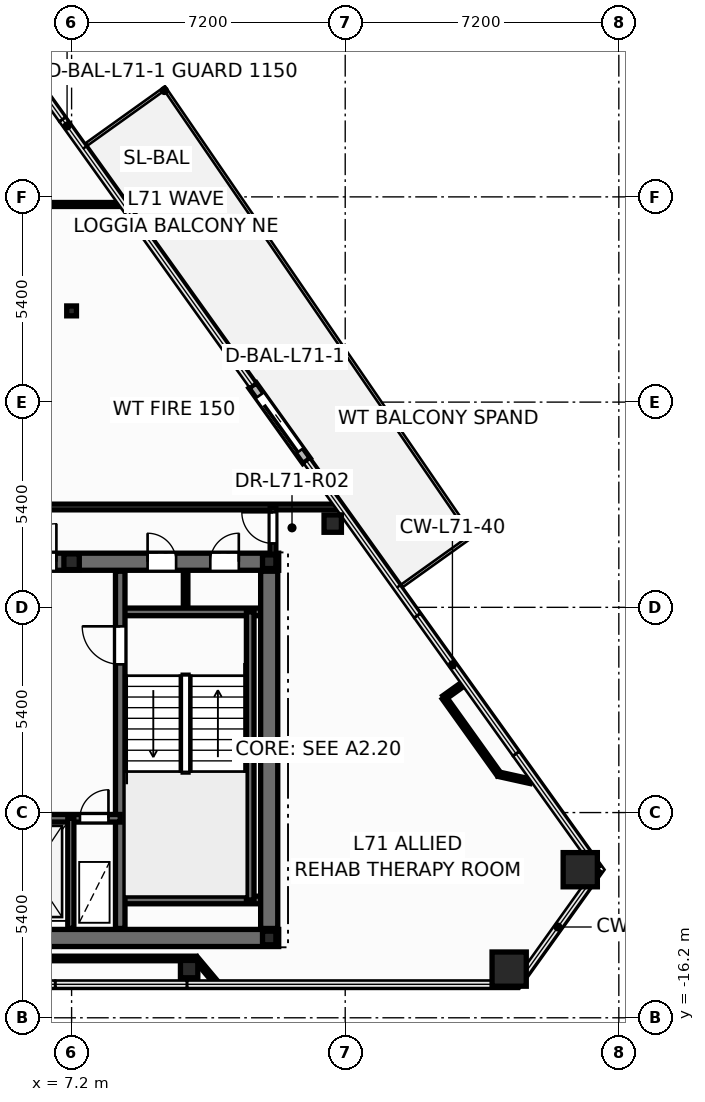
"""IFC4 building model, lengths in metres.
Left out: names, types, materials, properties, quantities, classifications, styles, units other than length and angle.
Written with IfcOpenShell. Run it as: python <this file> out.ifc"""

import sys

from ifc_helpers import new_model, si_unit, direction, frame, frame_2d, origin, origin_2d, place, context, subcontext, project, spatial, rectangle, hollow_rectangle, hollow_circle, i_section, extrude, element, fill, save


model = new_model("IFC4")
c1 = context("Model", 3, precision=1e-05, world=origin(), true_north=direction((0.0, 1.0)))
c2 = subcontext(c1, "Body", "Model", "MODEL_VIEW")
j1 = project(units=[si_unit("LENGTHUNIT", "METRE"), si_unit("PLANEANGLEUNIT", "RADIAN")], contexts=[c1])
p1 = place(None, origin())
s1 = spatial("IfcSite", under=j1, at=p1, CompositionType="ELEMENT")
p2 = place(p1, origin())
s2 = spatial("IfcBuilding", under=s1, at=p2, CompositionType="ELEMENT")
p3 = place(p2, frame((0.0, 0.0, 270.6)))
s3 = spatial("IfcBuildingStorey", under=s2, at=p3, CompositionType="ELEMENT", Elevation=270.6)
for number, where, z_axis, x_axis in (
    (1, (18.714, -14.919, 0.0), (0.0, 0.0, 1.0), (1.0, 0.0, 0.0)),
    (2, (20.585, -12.303, 0.0), (0.0, 0.0, 1.0), (1.0, 0.0, 0.0)),
):
    element("IfcColumn", number, at=place(p3, frame(where, z_axis=z_axis, x_axis=x_axis)), inside=s3, PredefinedType="COLUMN", context=c2, shape_type="SweptSolid", body=[
        extrude(hollow_rectangle(XDim=0.9, YDim=0.9, WallThickness=0.04, at=origin_2d()), origin(), (0.0, 0.0, 1.0), 3.6),
    ])
for number, where, z_axis, x_axis in (
    (3, (10.293, -14.919, 0.0), (0.0, 0.0, 1.0), (1.0, 0.0, 0.0)),
    (4, (14.072, -3.196, 0.0), (0.0, 0.0, 1.0), (1.0, 0.0, 0.0)),
    (5, (8.489, 4.61, 0.0), (0.0, 0.0, 1.0), (1.0, 0.0, 0.0)),
):
    element("IfcColumn", number, at=place(p3, frame(where, z_axis=z_axis, x_axis=x_axis)), inside=s3, PredefinedType="COLUMN", context=c2, shape_type="SweptSolid", body=[
        extrude(hollow_circle(Radius=0.229, WallThickness=0.016, at=origin_2d()), origin(), (0.0, 0.0, 1.0), 3.6),
    ])
for number, where, z_axis, x_axis in (
    (6, (12.4, -14.1, 0.0), (0.0, 0.0, 1.0), (1.0, 0.0, 0.0)),
    (7, (12.4, -4.2, 0.0), (0.0, 0.0, 1.0), (1.0, 0.0, 0.0)),
):
    element("IfcColumn", number, at=place(p3, frame(where, z_axis=z_axis, x_axis=x_axis)), inside=s3, PredefinedType="COLUMN", context=c2, shape_type="SweptSolid", body=[
        extrude(i_section(OverallWidth=0.352, OverallDepth=0.359, WebThickness=0.018, FlangeThickness=0.026, at=origin_2d()), origin(), (0.0, 0.0, 1.0), 3.6),
    ])
p4 = place(p3, frame((7.2, -4.2, 0.0), z_axis=(0.0, 0.0, 1.0), x_axis=(1.0, 0.0, 0.0)))
e8 = element("IfcColumn", 8, at=p4, inside=s3, PredefinedType="PILASTER", context=c2, shape_type="SweptSolid", body=[
    extrude(i_section(OverallWidth=0.405, OverallDepth=0.414, WebThickness=0.022, FlangeThickness=0.032, at=origin_2d()), origin(), (0.0, 0.0, 1.0), 3.6),
])
p5 = place(p3, frame((7.2, 2.4, 0.0), z_axis=(0.0, 0.0, 1.0), x_axis=(1.0, 0.0, 0.0)))
e9 = element("IfcColumn", 9, at=p5, inside=s3, PredefinedType="COLUMN", context=c2, shape_type="SweptSolid", body=[
    extrude(i_section(OverallWidth=0.256, OverallDepth=0.26, WebThickness=0.01, FlangeThickness=0.017, at=origin_2d()), origin(), (0.0, 0.0, 1.0), 3.6),
])
p6 = place(p3, frame((13.383, -1.547, -0.015), z_axis=(0.0, 0.0, 1.0), x_axis=(-0.58167352525, 0.813422344187, 0.0)))
e10 = element("IfcWall", 10, at=p6, inside=s3, PredefinedType="STANDARD", context=c2, shape_type="SweptSolid", body=[
    extrude(rectangle(XDim=2.44, YDim=0.24, at=frame_2d((1.22, 0.0))), origin(), (0.0, 0.0, 1.0), 2.878),
])
p7 = place(p6, frame((0.32, 0.0, 0.015)))
e11 = element("IfcOpeningElement", 11, at=p7, cuts=e10, PredefinedType="OPENING", context=c2, shape_type="SweptSolid", body=[
    extrude(rectangle(XDim=1.806, YDim=2.204, at=frame_2d((0.9, 1.102))), frame((0.0, 0.13, 0.0), z_axis=(0.0, -1.0, 0.0), x_axis=(1.0, 0.0, 0.0)), (0.0, 0.0, 1.0), 0.26),
])
p8 = place(p3, frame((10.2, -5.52, 0.0), z_axis=(0.0, 0.0, 1.0), x_axis=(0.0, 1.0, 0.0)))
e12 = element("IfcWall", 12, at=p8, inside=s3, PredefinedType="PARTITIONING", context=c2, shape_type="SweptSolid", body=[
    extrude(rectangle(XDim=1.12, YDim=0.12, at=frame_2d((0.56, 0.0))), origin(), (0.0, 0.0, 1.0), 3.345),
])
p9 = place(p3, frame((-12.65, -14.1, 0.0), z_axis=(0.0, 0.0, 1.0), x_axis=(1.0, 0.0, 0.0)))
e13 = element("IfcWall", 13, at=p9, inside=s3, PredefinedType="SHEAR", context=c2, shape_type="SweptSolid", body=[
    extrude(rectangle(XDim=25.3, YDim=0.45, at=frame_2d((12.65, 0.0))), origin(), (0.0, 0.0, 1.0), 3.6),
])
p10 = place(p3, frame((-12.65, -4.2, 0.0), z_axis=(0.0, 0.0, 1.0), x_axis=(1.0, 0.0, 0.0)))
e14 = element("IfcWall", 14, at=p10, inside=s3, PredefinedType="SHEAR", context=c2, shape_type="SweptSolid", body=[
    extrude(rectangle(XDim=25.3, YDim=0.45, at=frame_2d((12.65, 0.0))), origin(), (0.0, 0.0, 1.0), 3.6),
])
p11 = place(p10, frame((0.95, 0.0, 0.0)))
e15 = element("IfcOpeningElement", 15, at=p11, cuts=e14, PredefinedType="OPENING", context=c2, shape_type="SweptSolid", body=[
    extrude(rectangle(XDim=0.756, YDim=2.054, at=frame_2d((0.375, 1.027))), frame((0.0, 0.235, 0.0), z_axis=(0.0, -1.0, 0.0), x_axis=(1.0, 0.0, 0.0)), (0.0, 0.0, 1.0), 0.47),
])
p12 = place(p10, frame((2.6, 0.0, 0.0)))
e16 = element("IfcOpeningElement", 16, at=p12, cuts=e14, PredefinedType="OPENING", context=c2, shape_type="SweptSolid", body=[
    extrude(rectangle(XDim=0.756, YDim=2.054, at=frame_2d((0.375, 1.027))), frame((0.0, 0.235, 0.0), z_axis=(0.0, -1.0, 0.0), x_axis=(1.0, 0.0, 0.0)), (0.0, 0.0, 1.0), 0.47),
])
p13 = place(p10, frame((21.85, 0.0, 0.0)))
e17 = element("IfcOpeningElement", 17, at=p13, cuts=e14, PredefinedType="OPENING", context=c2, shape_type="SweptSolid", body=[
    extrude(rectangle(XDim=0.756, YDim=2.054, at=frame_2d((0.375, 1.027))), frame((0.0, 0.235, 0.0), z_axis=(0.0, -1.0, 0.0), x_axis=(1.0, 0.0, 0.0)), (0.0, 0.0, 1.0), 0.47),
])
p14 = place(p10, frame((23.5, 0.0, 0.0)))
e18 = element("IfcOpeningElement", 18, at=p14, cuts=e14, PredefinedType="OPENING", context=c2, shape_type="SweptSolid", body=[
    extrude(rectangle(XDim=0.756, YDim=2.054, at=frame_2d((0.375, 1.027))), frame((0.0, 0.235, 0.0), z_axis=(0.0, -1.0, 0.0), x_axis=(1.0, 0.0, 0.0)), (0.0, 0.0, 1.0), 0.47),
])
p15 = place(p10, frame((5.85, 0.0, 0.0)))
e19 = element("IfcOpeningElement", 19, at=p15, cuts=e14, PredefinedType="OPENING", context=c2, shape_type="SweptSolid", body=[
    extrude(rectangle(XDim=1.006, YDim=2.104, at=frame_2d((0.5, 1.052))), frame((0.0, 0.235, 0.0), z_axis=(0.0, -1.0, 0.0), x_axis=(1.0, 0.0, 0.0)), (0.0, 0.0, 1.0), 0.47),
])
p16 = place(p10, frame((10.35, 0.0, 0.0)))
e20 = element("IfcOpeningElement", 20, at=p16, cuts=e14, PredefinedType="OPENING", context=c2, shape_type="SweptSolid", body=[
    extrude(rectangle(XDim=1.406, YDim=2.154, at=frame_2d((0.7, 1.077))), frame((0.0, 0.235, 0.0), z_axis=(0.0, -1.0, 0.0), x_axis=(1.0, 0.0, 0.0)), (0.0, 0.0, 1.0), 0.47),
])
p17 = place(p10, frame((18.45, 0.0, 0.0)))
e21 = element("IfcOpeningElement", 21, at=p17, cuts=e14, PredefinedType="OPENING", context=c2, shape_type="SweptSolid", body=[
    extrude(rectangle(XDim=1.006, YDim=2.104, at=frame_2d((0.5, 1.052))), frame((0.0, 0.235, 0.0), z_axis=(0.0, -1.0, 0.0), x_axis=(1.0, 0.0, 0.0)), (0.0, 0.0, 1.0), 0.47),
])
for number, where, z_axis, x_axis in (
    (22, (8.48, -5.52, 0.0), (0.0, 0.0, 1.0), (1.0, 0.0, 0.0)),
    (23, (8.48, -13.1, 0.0), (0.0, 0.0, 1.0), (1.0, 0.0, 0.0)),
):
    element("IfcWall", number, at=place(p3, frame(where, z_axis=z_axis, x_axis=x_axis)), inside=s3, PredefinedType="SOLIDWALL", context=c2, shape_type="SweptSolid", body=[
        extrude(rectangle(XDim=3.87, YDim=0.2, at=frame_2d((1.935, 0.0))), origin(), (0.0, 0.0, 1.0), 3.6),
    ])
p18 = place(p3, frame((11.9, -13.1, 0.0), z_axis=(0.0, 0.0, 1.0), x_axis=(0.0, 1.0, 0.0)))
e24 = element("IfcWall", 24, at=p18, inside=s3, PredefinedType="SOLIDWALL", context=c2, shape_type="SweptSolid", body=[
    extrude(rectangle(XDim=7.58, YDim=0.2, at=frame_2d((3.79, 0.0))), origin(), (0.0, 0.0, 1.0), 3.6),
])
p19 = place(p3, frame((8.48, -13.85, 0.0), z_axis=(0.0, 0.0, 1.0), x_axis=(0.0, 1.0, 0.0)))
e25 = element("IfcWall", 25, at=p19, inside=s3, PredefinedType="SHEAR", context=c2, shape_type="SweptSolid", body=[
    extrude(rectangle(XDim=9.4, YDim=0.25, at=frame_2d((4.7, 0.0))), origin(), (0.0, 0.0, 1.0), 3.6),
])
p20 = place(p19, frame((6.95, 0.0, 0.0)))
e26 = element("IfcOpeningElement", 26, at=p20, cuts=e25, PredefinedType="OPENING", context=c2, shape_type="SweptSolid", body=[
    extrude(rectangle(XDim=1.006, YDim=2.104, at=frame_2d((0.5, 1.052))), frame((0.0, 0.135, 0.0), z_axis=(0.0, -1.0, 0.0), x_axis=(1.0, 0.0, 0.0)), (0.0, 0.0, 1.0), 0.27),
])
p21 = place(p3, frame((5.12, -10.95, 0.0), z_axis=(0.0, 0.0, 1.0), x_axis=(1.0, 0.0, 0.0)))
e27 = element("IfcWall", 27, at=p21, inside=s3, PredefinedType="SOLIDWALL", context=c2, shape_type="SweptSolid", body=[
    extrude(rectangle(XDim=3.36, YDim=0.2, at=frame_2d((1.68, 0.0))), origin(), (0.0, 0.0, 1.0), 3.6),
])
p22 = place(p21, frame((0.42, 0.0, 0.0)))
e28 = element("IfcOpeningElement", 28, at=p22, cuts=e27, PredefinedType="OPENING", context=c2, shape_type="SweptSolid", body=[
    extrude(rectangle(XDim=1.106, YDim=2.104, at=frame_2d((0.55, 1.052))), frame((0.0, 0.11, 0.0), z_axis=(0.0, -1.0, 0.0), x_axis=(1.0, 0.0, 0.0)), (0.0, 0.0, 1.0), 0.22),
])
p23 = place(p21, frame((2.3, 0.0, 0.0)))
e29 = element("IfcOpeningElement", 29, at=p23, cuts=e27, PredefinedType="OPENING", context=c2, shape_type="SweptSolid", body=[
    extrude(rectangle(XDim=0.756, YDim=2.054, at=frame_2d((0.375, 1.027))), frame((0.0, 0.11, 0.0), z_axis=(0.0, -1.0, 0.0), x_axis=(1.0, 0.0, 0.0)), (0.0, 0.0, 1.0), 0.22),
])
p24 = place(p3, frame((7.18, -13.85, 0.0), z_axis=(0.0, 0.0, 1.0), x_axis=(0.0, 1.0, 0.0)))
e30 = element("IfcWall", 30, at=p24, inside=s3, PredefinedType="PARTITIONING", context=c2, shape_type="SweptSolid", body=[
    extrude(rectangle(XDim=2.9, YDim=0.16, at=frame_2d((1.45, 0.0))), origin(), (0.0, 0.0, 1.0), 2.57),
])
p25 = place(p3, frame((12.4, -13.85, 0.0), z_axis=(0.0, 0.0, 1.0), x_axis=(0.0, 1.0, 0.0)))
e31 = element("IfcWall", 31, at=p25, inside=s3, PredefinedType="SHEAR", context=c2, shape_type="SweptSolid", body=[
    extrude(rectangle(XDim=9.4, YDim=0.45, at=frame_2d((4.7, 0.0))), origin(), (0.0, 0.0, 1.0), 3.6),
])
p26 = place(p3, frame((-0.64, -2.76, 0.0), z_axis=(0.0, 0.0, 1.0), x_axis=(1.0, 0.0, 0.0)))
e32 = element("IfcWall", 32, at=p26, inside=s3, PredefinedType="PARTITIONING", context=c2, shape_type="SweptSolid", body=[
    extrude(rectangle(XDim=14.891, YDim=0.15, at=frame_2d((7.446, 0.0))), origin(), (0.0, 0.0, 1.0), 2.32),
])
p27 = place(p26, frame((2.193, 0.0, 0.0)))
e33 = element("IfcOpeningElement", 33, at=p27, cuts=e32, PredefinedType="OPENING", context=c2, shape_type="SweptSolid", body=[
    extrude(rectangle(XDim=0.906, YDim=2.104, at=frame_2d((0.45, 1.052))), frame((0.0, 0.085, 0.0), z_axis=(0.0, -1.0, 0.0), x_axis=(1.0, 0.0, 0.0)), (0.0, 0.0, 1.0), 0.17),
])
p28 = place(p3, frame((-0.64, 5.2, 0.0), z_axis=(0.0, 0.0, 1.0), x_axis=(1.0, 0.0, 0.0)))
e34 = element("IfcWall", 34, at=p28, inside=s3, PredefinedType="PARTITIONING", context=c2, shape_type="SweptSolid", body=[
    extrude(rectangle(XDim=9.198, YDim=0.105, at=frame_2d((4.599, 0.0))), origin(), (0.0, 0.0, 1.0), 2.32),
])
p29 = place(p3, frame((6.542, -14.639, 0.0), z_axis=(0.0, 0.0, 1.0), x_axis=(1.0, 0.0, 0.0)))
e35 = element("IfcWall", 35, at=p29, inside=s3, PredefinedType="PARTITIONING", context=c2, shape_type="SweptSolid", body=[
    extrude(rectangle(XDim=3.926, YDim=0.12, at=frame_2d((1.963, 0.0))), origin(), (0.0, 0.0, 1.0), 3.345),
])
p30 = place(p3, frame((18.445, -9.793, 0.0), z_axis=(0.0, 0.0, 1.0), x_axis=(-0.581731659236, 0.813380769777, 0.0)))
e36 = element("IfcWall", 36, at=p30, inside=s3, PredefinedType="PARTITIONING", context=c2, shape_type="SweptSolid", body=[
    extrude(rectangle(XDim=2.48, YDim=0.12, at=frame_2d((1.24, 0.0))), origin(), (0.0, 0.0, 1.0), 2.32),
])
p31 = place(p3, frame((12.5, -4.24, 0.0), z_axis=(0.0, 0.0, 1.0), x_axis=(0.0, 1.0, 0.0)))
e37 = element("IfcWall", 37, at=p31, inside=s3, PredefinedType="PARTITIONING", context=c2, shape_type="SweptSolid", body=[
    extrude(rectangle(XDim=1.48, YDim=0.15, at=frame_2d((0.74, 0.0))), origin(), (0.0, 0.0, 1.0), 2.32),
])
p32 = place(p31, frame((0.522, 0.0, 0.0)))
e38 = element("IfcOpeningElement", 38, at=p32, cuts=e37, PredefinedType="OPENING", context=c2, shape_type="SweptSolid", body=[
    extrude(rectangle(XDim=0.826, YDim=2.104, at=frame_2d((0.41, 1.052))), frame((0.0, 0.085, 0.0), z_axis=(0.0, -1.0, 0.0), x_axis=(1.0, 0.0, 0.0)), (0.0, 0.0, 1.0), 0.17),
])
p33 = place(p3, frame((10.468, -14.639, 0.0), z_axis=(0.0, 0.0, 1.0), x_axis=(0.642543514204, -0.766249197295, 0.0)))
e39 = element("IfcWall", 39, at=p33, inside=s3, PredefinedType="PARTITIONING", context=c2, shape_type="SweptSolid", body=[
    extrude(rectangle(XDim=0.874, YDim=0.12, at=frame_2d((0.437, 0.0))), origin(), (0.0, 0.0, 1.0), 2.863),
])
p34 = place(p3, frame((19.276, -9.978, 0.0), z_axis=(0.0, 0.0, 1.0), x_axis=(-0.976274708093, 0.216535665279, 0.0)))
e40 = element("IfcWall", 40, at=p34, inside=s3, PredefinedType="PARTITIONING", context=c2, shape_type="SweptSolid", body=[
    extrude(rectangle(XDim=0.851, YDim=0.12, at=frame_2d((0.426, 0.0))), origin(), (0.0, 0.0, 1.0), 2.863),
])
p35 = place(p3, frame((17.003, -7.776, 0.0), z_axis=(0.0, 0.0, 1.0), x_axis=(0.813265440227, 0.581892879947, 0.0)))
e41 = element("IfcWall", 41, at=p35, inside=s3, PredefinedType="PARTITIONING", context=c2, shape_type="SweptSolid", body=[
    extrude(rectangle(XDim=0.67, YDim=0.12, at=frame_2d((0.335, 0.0))), origin(), (0.0, 0.0, 1.0), 2.863),
])
p36 = place(p7, origin())
e42 = element("IfcDoor", 42, at=p36, inside=s3, OperationType="SLIDING_TO_LEFT", PredefinedType="DOOR", context=c2, shape_type="SweptSolid", body=[
    extrude(rectangle(XDim=1.8, YDim=2.2, at=frame_2d((0.9, 1.1))), frame((0.0, 0.025, 0.0), z_axis=(0.0, -1.0, 0.0), x_axis=(1.0, 0.0, 0.0)), (0.0, 0.0, 1.0), 0.05),
])
fill(e11, e42)
p37 = place(p20, origin())
e43 = element("IfcDoor", 43, at=p37, inside=s3, OperationType="SINGLE_SWING_RIGHT", PredefinedType="DOOR", context=c2, shape_type="SweptSolid", body=[
    extrude(rectangle(XDim=1.0, YDim=2.1, at=frame_2d((0.5, 1.05))), frame((0.0, 0.025, 0.0), z_axis=(0.0, -1.0, 0.0), x_axis=(1.0, 0.0, 0.0)), (0.0, 0.0, 1.0), 0.05),
])
fill(e26, e43)
p38 = place(p23, origin())
e44 = element("IfcDoor", 44, at=p38, inside=s3, OperationType="SINGLE_SWING_RIGHT", PredefinedType="DOOR", context=c2, shape_type="SweptSolid", body=[
    extrude(rectangle(XDim=0.75, YDim=2.05, at=frame_2d((0.375, 1.025))), frame((0.0, 0.025, 0.0), z_axis=(0.0, -1.0, 0.0), x_axis=(1.0, 0.0, 0.0)), (0.0, 0.0, 1.0), 0.05),
])
fill(e29, e44)
p39 = place(p13, origin())
e45 = element("IfcDoor", 45, at=p39, inside=s3, OperationType="SINGLE_SWING_LEFT", PredefinedType="DOOR", context=c2, shape_type="SweptSolid", body=[
    extrude(rectangle(XDim=0.75, YDim=2.05, at=frame_2d((0.375, 1.025))), frame((0.0, 0.025, 0.0), z_axis=(0.0, -1.0, 0.0), x_axis=(1.0, 0.0, 0.0)), (0.0, 0.0, 1.0), 0.05),
])
fill(e17, e45)
p40 = place(p14, origin())
e46 = element("IfcDoor", 46, at=p40, inside=s3, OperationType="SINGLE_SWING_RIGHT", PredefinedType="DOOR", context=c2, shape_type="SweptSolid", body=[
    extrude(rectangle(XDim=0.75, YDim=2.05, at=frame_2d((0.375, 1.025))), frame((0.0, 0.025, 0.0), z_axis=(0.0, -1.0, 0.0), x_axis=(1.0, 0.0, 0.0)), (0.0, 0.0, 1.0), 0.05),
])
fill(e18, e46)
p41 = place(p17, origin())
e47 = element("IfcDoor", 47, at=p41, inside=s3, OperationType="SINGLE_SWING_RIGHT", PredefinedType="DOOR", context=c2, shape_type="SweptSolid", body=[
    extrude(rectangle(XDim=1.0, YDim=2.1, at=frame_2d((0.5, 1.05))), frame((0.0, 0.025, 0.0), z_axis=(0.0, -1.0, 0.0), x_axis=(1.0, 0.0, 0.0)), (0.0, 0.0, 1.0), 0.05),
])
fill(e21, e47)
p42 = place(p32, origin())
e48 = element("IfcDoor", 48, at=p42, inside=s3, OperationType="SINGLE_SWING_RIGHT", PredefinedType="DOOR", context=c2, shape_type="SweptSolid", body=[
    extrude(rectangle(XDim=0.82, YDim=2.1, at=frame_2d((0.41, 1.05))), frame((0.0, 0.025, 0.0), z_axis=(0.0, -1.0, 0.0), x_axis=(1.0, 0.0, 0.0)), (0.0, 0.0, 1.0), 0.05),
])
fill(e38, e48)
save(model, sys.argv[1])
